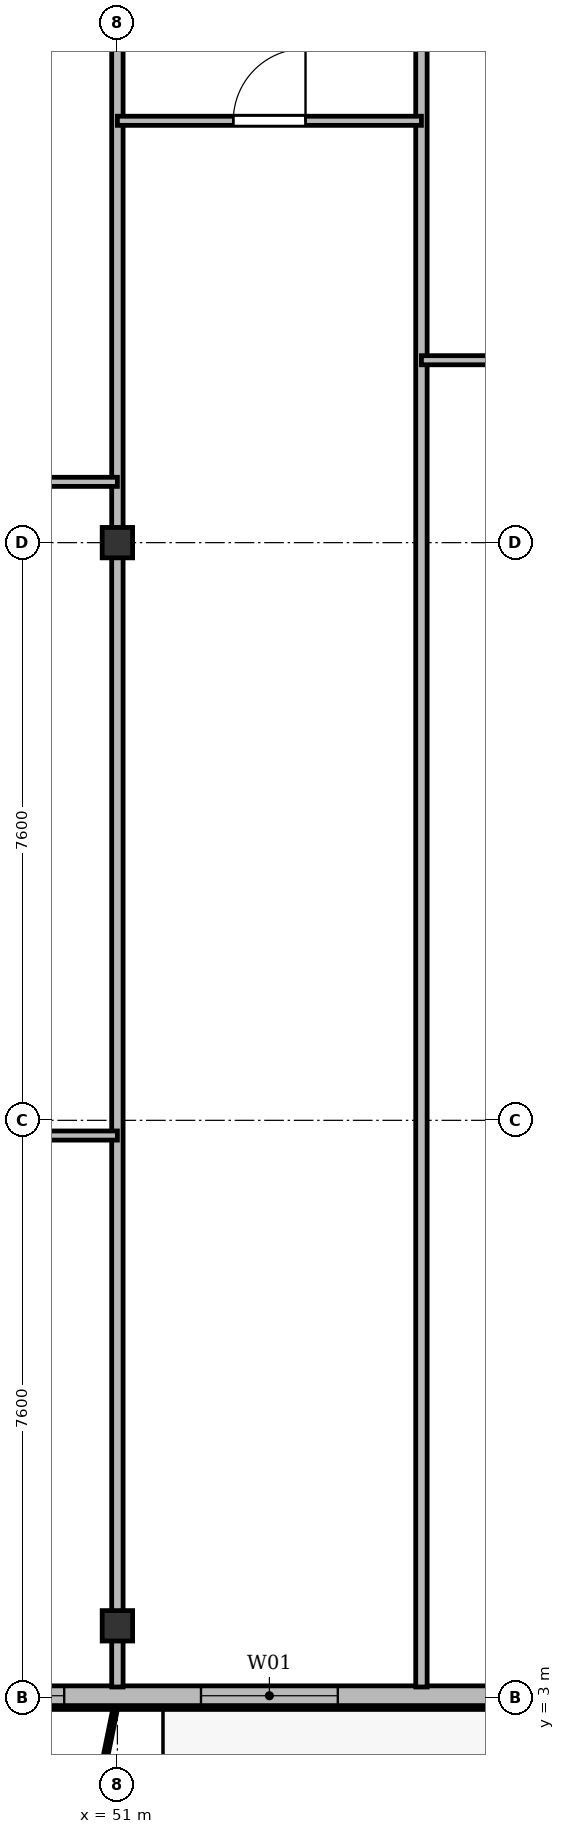
"""IFC4 building model, lengths in metres.
Left out: names, types, materials, properties, quantities, classifications, styles, units other than length and angle.
Written with IfcOpenShell. Run it as: python <this file> out.ifc"""

import sys

from ifc_helpers import new_model, si_unit, direction, frame, frame_2d, origin, origin_2d, place, context, subcontext, project, spatial, rectangle, i_section, extrude, source, transform, mapped, element, fill, save


model = new_model("IFC4")
c1 = context("Model", 3, precision=1e-05, world=origin(), true_north=direction((0.0, 1.0)))
c2 = subcontext(c1, "Body", "Model", "MODEL_VIEW")
j1 = project(units=[si_unit("LENGTHUNIT", "METRE"), si_unit("PLANEANGLEUNIT", "RADIAN")], contexts=[c1])
p1 = place(None, origin())
s1 = spatial("IfcSite", under=j1, at=p1, CompositionType="ELEMENT")
p2 = place(p1, origin())
s2 = spatial("IfcBuilding", under=s1, at=p2, CompositionType="ELEMENT")
p3 = place(p2, frame((0.0, 0.0, 103.3)))
s3 = spatial("IfcBuildingStorey", under=s2, at=p3, CompositionType="ELEMENT", Elevation=103.3)
m1 = source(origin(), c2, "Body", "SweptSolid", [
    extrude(i_section(OverallWidth=0.4, OverallDepth=0.4, WebThickness=0.022, FlangeThickness=0.035, at=origin_2d()), origin(), (0.0, 0.0, 1.0), 3.6),
])
for number, where, z_axis, x_axis in (
    (1, (51.0, 3.95, 0.0), (0.0, 0.0, 1.0), (1.0, 0.0, 0.0)),
    (2, (51.0, 18.2, 0.0), (0.0, 0.0, 1.0), (1.0, 0.0, 0.0)),
):
    element("IfcColumn", number, at=place(p3, frame(where, z_axis=z_axis, x_axis=x_axis)), inside=s3, PredefinedType="COLUMN", context=c2, shape_type="MappedRepresentation", body=[
        mapped(m1, transform((0.0, 0.0, 0.0), x_axis=(1.0, 0.0, 0.0), y_axis=(0.0, 1.0, 0.0), z_axis=(0.0, 0.0, 1.0), scale=1.0)),
    ])
p4 = place(p3, frame((66.9, 3.03, 0.0), z_axis=(0.0, 0.0, 1.0), x_axis=(-1.0, 0.0, 0.0)))
e3 = element("IfcWall", 3, at=p4, inside=s3, PredefinedType="SOLIDWALL", context=c2, shape_type="SweptSolid", body=[
    extrude(rectangle(XDim=59.4, YDim=0.26, at=frame_2d((29.7, 0.0))), origin(), (0.0, 0.0, 1.0), 3.34),
])
p5 = place(p4, frame((2.25, 0.0, 0.9)))
e4 = element("IfcOpeningElement", 4, at=p5, cuts=e3, PredefinedType="OPENING", context=c2, shape_type="SweptSolid", body=[
    extrude(rectangle(XDim=1.5, YDim=1.75, at=frame_2d((0.75, 0.875))), frame((0.0, 0.14, 0.0), z_axis=(0.0, -1.0, 0.0), x_axis=(1.0, 0.0, 0.0)), (0.0, 0.0, 1.0), 0.28),
])
p6 = place(p4, frame((5.4, 0.0, 0.9)))
e5 = element("IfcOpeningElement", 5, at=p6, cuts=e3, PredefinedType="OPENING", context=c2, shape_type="SweptSolid", body=[
    extrude(rectangle(XDim=2.0, YDim=1.95, at=frame_2d((1.0, 0.975))), frame((0.0, 0.14, 0.0), z_axis=(0.0, -1.0, 0.0), x_axis=(1.0, 0.0, 0.0)), (0.0, 0.0, 1.0), 0.28),
])
p7 = place(p4, frame((9.213, 0.0, 0.0)))
e6 = element("IfcOpeningElement", 6, at=p7, cuts=e3, PredefinedType="OPENING", context=c2, shape_type="SweptSolid", body=[
    extrude(rectangle(XDim=1.2, YDim=2.2, at=frame_2d((0.6, 1.1))), frame((0.0, 0.14, 0.0), z_axis=(0.0, -1.0, 0.0), x_axis=(1.0, 0.0, 0.0)), (0.0, 0.0, 1.0), 0.28),
])
p8 = place(p4, frame((13.0, 0.0, 0.9)))
e7 = element("IfcOpeningElement", 7, at=p8, cuts=e3, PredefinedType="OPENING", context=c2, shape_type="SweptSolid", body=[
    extrude(rectangle(XDim=1.8, YDim=1.8, at=frame_2d((0.9, 0.9))), frame((0.0, 0.14, 0.0), z_axis=(0.0, -1.0, 0.0), x_axis=(1.0, 0.0, 0.0)), (0.0, 0.0, 1.0), 0.28),
])
p9 = place(p4, frame((16.6, 0.0, 0.9)))
e8 = element("IfcOpeningElement", 8, at=p9, cuts=e3, PredefinedType="OPENING", context=c2, shape_type="SweptSolid", body=[
    extrude(rectangle(XDim=2.2, YDim=1.8, at=frame_2d((1.1, 0.9))), frame((0.0, 0.14, 0.0), z_axis=(0.0, -1.0, 0.0), x_axis=(1.0, 0.0, 0.0)), (0.0, 0.0, 1.0), 0.28),
])
p10 = place(p4, frame((20.55, 0.0, 0.9)))
e9 = element("IfcOpeningElement", 9, at=p10, cuts=e3, PredefinedType="OPENING", context=c2, shape_type="SweptSolid", body=[
    extrude(rectangle(XDim=1.5, YDim=1.75, at=frame_2d((0.75, 0.875))), frame((0.0, 0.14, 0.0), z_axis=(0.0, -1.0, 0.0), x_axis=(1.0, 0.0, 0.0)), (0.0, 0.0, 1.0), 0.28),
])
p11 = place(p4, frame((25.4, 0.0, 0.9)))
e10 = element("IfcOpeningElement", 10, at=p11, cuts=e3, PredefinedType="OPENING", context=c2, shape_type="SweptSolid", body=[
    extrude(rectangle(XDim=2.0, YDim=1.95, at=frame_2d((1.0, 0.975))), frame((0.0, 0.14, 0.0), z_axis=(0.0, -1.0, 0.0), x_axis=(1.0, 0.0, 0.0)), (0.0, 0.0, 1.0), 0.28),
])
p12 = place(p4, frame((32.175, 0.0, 0.9)))
e11 = element("IfcOpeningElement", 11, at=p12, cuts=e3, PredefinedType="OPENING", context=c2, shape_type="SweptSolid", body=[
    extrude(rectangle(XDim=1.65, YDim=1.85, at=frame_2d((0.825, 0.925))), frame((0.0, 0.14, 0.0), z_axis=(0.0, -1.0, 0.0), x_axis=(1.0, 0.0, 0.0)), (0.0, 0.0, 1.0), 0.28),
])
p13 = place(p4, frame((37.584, 0.0, 0.0)))
e12 = element("IfcOpeningElement", 12, at=p13, cuts=e3, PredefinedType="OPENING", context=c2, shape_type="SweptSolid", body=[
    extrude(rectangle(XDim=1.2, YDim=2.2, at=frame_2d((0.6, 1.1))), frame((0.0, 0.14, 0.0), z_axis=(0.0, -1.0, 0.0), x_axis=(1.0, 0.0, 0.0)), (0.0, 0.0, 1.0), 0.28),
])
p14 = place(p4, frame((40.5, 0.0, 0.9)))
e13 = element("IfcOpeningElement", 13, at=p14, cuts=e3, PredefinedType="OPENING", context=c2, shape_type="SweptSolid", body=[
    extrude(rectangle(XDim=2.2, YDim=1.8, at=frame_2d((1.1, 0.9))), frame((0.0, 0.14, 0.0), z_axis=(0.0, -1.0, 0.0), x_axis=(1.0, 0.0, 0.0)), (0.0, 0.0, 1.0), 0.28),
])
p15 = place(p4, frame((46.65, 0.0, 0.9)))
e14 = element("IfcOpeningElement", 14, at=p15, cuts=e3, PredefinedType="OPENING", context=c2, shape_type="SweptSolid", body=[
    extrude(rectangle(XDim=1.5, YDim=1.75, at=frame_2d((0.75, 0.875))), frame((0.0, 0.14, 0.0), z_axis=(0.0, -1.0, 0.0), x_axis=(1.0, 0.0, 0.0)), (0.0, 0.0, 1.0), 0.28),
])
p16 = place(p4, frame((55.817, 0.0, 0.0)))
e15 = element("IfcOpeningElement", 15, at=p16, cuts=e3, PredefinedType="OPENING", context=c2, shape_type="SweptSolid", body=[
    extrude(rectangle(XDim=1.2, YDim=2.2, at=frame_2d((0.6, 1.1))), frame((0.0, 0.14, 0.0), z_axis=(0.0, -1.0, 0.0), x_axis=(1.0, 0.0, 0.0)), (0.0, 0.0, 1.0), 0.28),
])
p17 = place(p3, frame((51.0, 3.145, 0.0), z_axis=(0.0, 0.0, 1.0), x_axis=(0.0, 1.0, 0.0)))
e16 = element("IfcWall", 16, at=p17, inside=s3, PredefinedType="PARTITIONING", context=c2, shape_type="SweptSolid", body=[
    extrude(rectangle(XDim=24.455, YDim=0.15, at=frame_2d((12.228, 0.0))), origin(), (0.0, 0.0, 1.0), 2.84),
])
p18 = place(p3, frame((55.0, 3.145, 0.0), z_axis=(0.0, 0.0, 1.0), x_axis=(0.0, 1.0, 0.0)))
e17 = element("IfcWall", 17, at=p18, inside=s3, PredefinedType="PARTITIONING", context=c2, shape_type="SweptSolid", body=[
    extrude(rectangle(XDim=24.455, YDim=0.15, at=frame_2d((12.228, 0.0))), origin(), (0.0, 0.0, 1.0), 2.752),
])
p19 = place(p3, frame((43.8, 19.0, 0.0), z_axis=(0.0, 0.0, 1.0), x_axis=(1.0, 0.0, 0.0)))
e18 = element("IfcWall", 18, at=p19, inside=s3, PredefinedType="PARTITIONING", context=c2, shape_type="SweptSolid", body=[
    extrude(rectangle(XDim=7.2, YDim=0.12, at=frame_2d((3.6, 0.0))), origin(), (0.0, 0.0, 1.0), 2.84),
])
p20 = place(p19, frame((3.125, 0.0, 0.0)))
e19 = element("IfcOpeningElement", 19, at=p20, cuts=e18, PredefinedType="OPENING", context=c2, shape_type="SweptSolid", body=[
    extrude(rectangle(XDim=0.95, YDim=2.15, at=frame_2d((0.475, 1.075))), frame((0.0, 0.07, 0.0), z_axis=(0.0, -1.0, 0.0), x_axis=(1.0, 0.0, 0.0)), (0.0, 0.0, 1.0), 0.14),
])
p21 = place(p3, frame((47.4, 10.4, 0.0), z_axis=(0.0, 0.0, 1.0), x_axis=(1.0, 0.0, 0.0)))
e20 = element("IfcWall", 20, at=p21, inside=s3, PredefinedType="PARTITIONING", context=c2, shape_type="SweptSolid", body=[
    extrude(rectangle(XDim=3.6, YDim=0.12, at=frame_2d((1.8, 0.0))), origin(), (0.0, 0.0, 1.0), 2.84),
])
p22 = place(p21, frame((1.325, 0.0, 0.0)))
e21 = element("IfcOpeningElement", 21, at=p22, cuts=e20, PredefinedType="OPENING", context=c2, shape_type="SweptSolid", body=[
    extrude(rectangle(XDim=0.95, YDim=2.15, at=frame_2d((0.475, 1.075))), frame((0.0, 0.07, 0.0), z_axis=(0.0, -1.0, 0.0), x_axis=(1.0, 0.0, 0.0)), (0.0, 0.0, 1.0), 0.14),
])
p23 = place(p3, frame((51.0, 23.75, 0.0), z_axis=(0.0, 0.0, 1.0), x_axis=(1.0, 0.0, 0.0)))
e22 = element("IfcWall", 22, at=p23, inside=s3, PredefinedType="PARTITIONING", context=c2, shape_type="SweptSolid", body=[
    extrude(rectangle(XDim=4.0, YDim=0.12, at=frame_2d((2.0, 0.0))), origin(), (0.0, 0.0, 1.0), 2.84),
])
p24 = place(p23, frame((1.525, 0.0, 0.0)))
e23 = element("IfcOpeningElement", 23, at=p24, cuts=e22, PredefinedType="OPENING", context=c2, shape_type="SweptSolid", body=[
    extrude(rectangle(XDim=0.95, YDim=2.15, at=frame_2d((0.475, 1.075))), frame((0.0, 0.07, 0.0), z_axis=(0.0, -1.0, 0.0), x_axis=(1.0, 0.0, 0.0)), (0.0, 0.0, 1.0), 0.14),
])
p25 = place(p3, frame((55.0, 20.6, 0.0), z_axis=(0.0, 0.0, 1.0), x_axis=(1.0, 0.0, 0.0)))
e24 = element("IfcWall", 24, at=p25, inside=s3, PredefinedType="PARTITIONING", context=c2, shape_type="SweptSolid", body=[
    extrude(rectangle(XDim=3.8, YDim=0.12, at=frame_2d((1.9, 0.0))), origin(), (0.0, 0.0, 1.0), 2.84),
])
p26 = place(p25, frame((1.33, 0.0, 0.0)))
e25 = element("IfcOpeningElement", 25, at=p26, cuts=e24, PredefinedType="OPENING", context=c2, shape_type="SweptSolid", body=[
    extrude(rectangle(XDim=0.95, YDim=2.15, at=frame_2d((0.475, 1.075))), frame((0.0, 0.07, 0.0), z_axis=(0.0, -1.0, 0.0), x_axis=(1.0, 0.0, 0.0)), (0.0, 0.0, 1.0), 0.14),
])
m2 = source(origin(), c2, "Body", "SweptSolid", [
    extrude(rectangle(XDim=1.8, YDim=1.8, at=frame_2d((0.9, 0.9))), frame((0.0, 0.03, 0.0), z_axis=(0.0, -1.0, 0.0), x_axis=(1.0, 0.0, 0.0)), (0.0, 0.0, 1.0), 0.06),
])
p27 = place(p8, origin())
e26 = element("IfcWindow", 26, at=p27, inside=s3, PartitioningType="SINGLE_PANEL", PredefinedType="WINDOW", context=c2, shape_type="MappedRepresentation", body=[
    mapped(m2, transform((0.0, 0.0, 0.0), x_axis=(1.0, 0.0, 0.0), y_axis=(0.0, 1.0, 0.0), z_axis=(0.0, 0.0, 1.0), scale=1.0)),
])
fill(e7, e26)
m3 = source(origin(), c2, "Body", "SweptSolid", [
    extrude(rectangle(XDim=2.2, YDim=1.8, at=frame_2d((1.1, 0.9))), frame((0.0, 0.03, 0.0), z_axis=(0.0, -1.0, 0.0), x_axis=(1.0, 0.0, 0.0)), (0.0, 0.0, 1.0), 0.06),
])
p28 = place(p9, origin())
e27 = element("IfcWindow", 27, at=p28, inside=s3, PartitioningType="SINGLE_PANEL", PredefinedType="WINDOW", context=c2, shape_type="MappedRepresentation", body=[
    mapped(m3, transform((0.0, 0.0, 0.0), x_axis=(1.0, 0.0, 0.0), y_axis=(0.0, 1.0, 0.0), z_axis=(0.0, 0.0, 1.0), scale=1.0)),
])
fill(e8, e27)
m4 = source(origin(), c2, "Body", "SweptSolid", [
    extrude(rectangle(XDim=0.95, YDim=2.15, at=frame_2d((0.475, 1.075))), frame((0.0, 0.025, 0.0), z_axis=(0.0, -1.0, 0.0), x_axis=(1.0, 0.0, 0.0)), (0.0, 0.0, 1.0), 0.05),
])
p29 = place(p24, origin())
e28 = element("IfcDoor", 28, at=p29, inside=s3, OperationType="SINGLE_SWING_RIGHT", PredefinedType="DOOR", context=c2, shape_type="MappedRepresentation", body=[
    mapped(m4, transform((0.0, 0.0, 0.0), x_axis=(1.0, 0.0, 0.0), y_axis=(0.0, 1.0, 0.0), z_axis=(0.0, 0.0, 1.0), scale=1.0)),
])
fill(e23, e28)
save(model, sys.argv[1])
